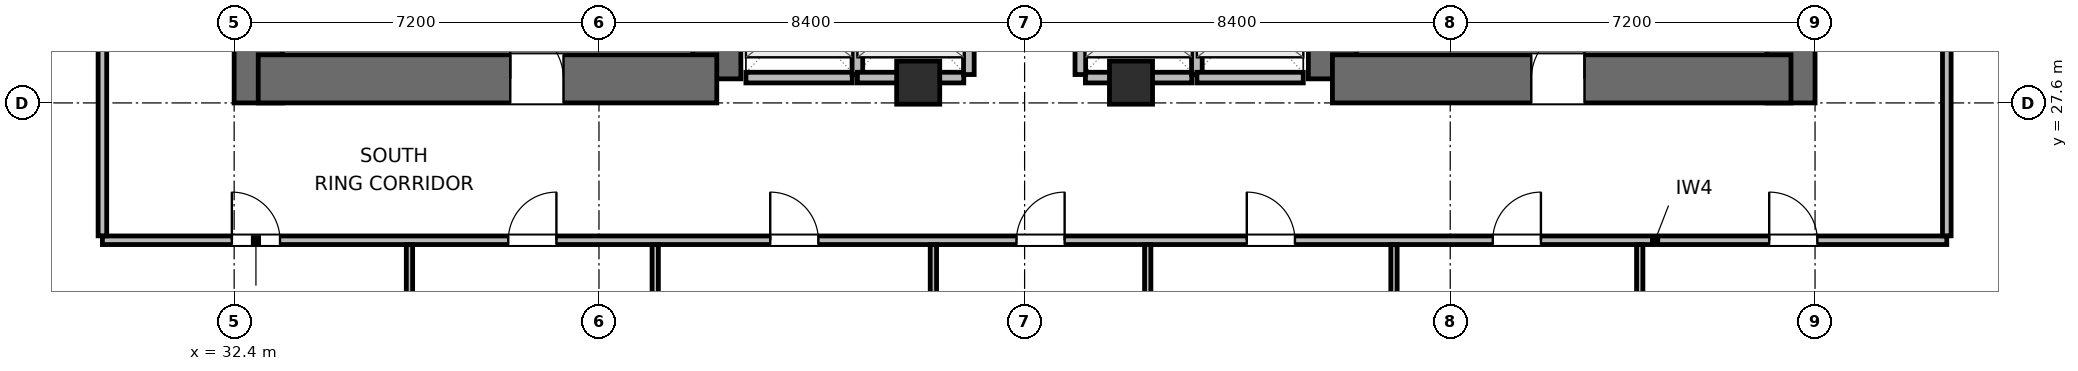
"""IFC4 building model, lengths in metres.
Left out: names, types, materials, properties, quantities, classifications, styles, units other than length and angle.
Written with IfcOpenShell. Run it as: python <this file> out.ifc"""

import sys

from ifc_helpers import new_model, si_unit, direction, frame, frame_2d, origin, origin_2d, place, context, subcontext, project, spatial, rectangle, extrude, element, fill, save


model = new_model("IFC4")
c1 = context("Model", 3, precision=1e-05, world=origin(), true_north=direction((0.0, 1.0)))
c2 = subcontext(c1, "Body", "Model", "MODEL_VIEW")
j1 = project(units=[si_unit("LENGTHUNIT", "METRE"), si_unit("PLANEANGLEUNIT", "RADIAN")], contexts=[c1])
p1 = place(None, origin())
s1 = spatial("IfcSite", under=j1, at=p1, CompositionType="ELEMENT")
p2 = place(p1, origin())
s2 = spatial("IfcBuilding", under=s1, at=p2, CompositionType="ELEMENT")
p3 = place(p2, frame((0.0, 0.0, 45.0)))
s3 = spatial("IfcBuildingStorey", under=s2, at=p3, CompositionType="ELEMENT", Elevation=45.0)
p4 = place(p3, frame((32.875, 27.6, 0.0), z_axis=(0.0, 0.0, 1.0), x_axis=(0.0, 1.0, 0.0)))
e1 = element("IfcWall", 1, at=p4, inside=s3, PredefinedType="SHEAR", context=c2, shape_type="SweptSolid", body=[
    extrude(rectangle(XDim=16.8, YDim=0.95, at=frame_2d((8.4, 0.0))), origin(), (0.0, 0.0, 1.0), 3.9),
])
p5 = place(p3, frame((41.925, 28.075, 0.0), z_axis=(0.0, 0.0, 1.0), x_axis=(0.0, 1.0, 0.0)))
e2 = element("IfcWall", 2, at=p5, inside=s3, PredefinedType="SHEAR", context=c2, shape_type="SweptSolid", body=[
    extrude(rectangle(XDim=6.325, YDim=0.95, at=frame_2d((3.163, 0.0))), origin(), (0.0, 0.0, 1.0), 3.9),
])
p6 = place(p3, frame((32.875, 28.075, 0.0), z_axis=(0.0, 0.0, 1.0), x_axis=(1.0, 0.0, 0.0)))
e3 = element("IfcWall", 3, at=p6, inside=s3, PredefinedType="SHEAR", context=c2, shape_type="SweptSolid", body=[
    extrude(rectangle(XDim=9.05, YDim=0.95, at=frame_2d((4.525, 0.0))), origin(), (0.0, 0.0, 1.0), 3.9),
])
p7 = place(p6, frame((4.975, 0.0, 0.0)))
e4 = element("IfcOpeningElement", 4, at=p7, cuts=e3, PredefinedType="OPENING", context=c2, shape_type="SweptSolid", body=[
    extrude(rectangle(XDim=1.05, YDim=2.04, at=frame_2d((0.525, 1.02))), frame((0.0, 0.485, 0.0), z_axis=(0.0, -1.0, 0.0), x_axis=(1.0, 0.0, 0.0)), (0.0, 0.0, 1.0), 0.97),
])
p8 = place(p3, frame((54.075, 28.075, 0.0), z_axis=(0.0, 0.0, 1.0), x_axis=(0.0, 1.0, 0.0)))
e5 = element("IfcWall", 5, at=p8, inside=s3, PredefinedType="SHEAR", context=c2, shape_type="SweptSolid", body=[
    extrude(rectangle(XDim=7.725, YDim=0.95, at=frame_2d((3.863, 0.0))), origin(), (0.0, 0.0, 1.0), 3.9),
])
p9 = place(p3, frame((63.125, 27.6, 0.0), z_axis=(0.0, 0.0, 1.0), x_axis=(0.0, 1.0, 0.0)))
e6 = element("IfcWall", 6, at=p9, inside=s3, PredefinedType="SHEAR", context=c2, shape_type="SweptSolid", body=[
    extrude(rectangle(XDim=16.8, YDim=0.95, at=frame_2d((8.4, 0.0))), origin(), (0.0, 0.0, 1.0), 3.9),
])
p10 = place(p3, frame((54.075, 28.075, 0.0), z_axis=(0.0, 0.0, 1.0), x_axis=(1.0, 0.0, 0.0)))
e7 = element("IfcWall", 7, at=p10, inside=s3, PredefinedType="SHEAR", context=c2, shape_type="SweptSolid", body=[
    extrude(rectangle(XDim=9.05, YDim=0.95, at=frame_2d((4.525, 0.0))), origin(), (0.0, 0.0, 1.0), 3.9),
])
p11 = place(p10, frame((3.925, 0.0, 0.0)))
e8 = element("IfcOpeningElement", 8, at=p11, cuts=e7, PredefinedType="OPENING", context=c2, shape_type="SweptSolid", body=[
    extrude(rectangle(XDim=1.05, YDim=2.04, at=frame_2d((0.525, 1.02))), frame((0.0, 0.485, 0.0), z_axis=(0.0, -1.0, 0.0), x_axis=(1.0, 0.0, 0.0)), (0.0, 0.0, 1.0), 0.97),
])
for number, where, z_axis, x_axis in (
    (9, (45.9, 28.0, 0.0), (0.0, 0.0, 1.0), (1.0, 0.0, 0.0)),
    (10, (50.1, 28.0, 0.0), (0.0, 0.0, 1.0), (1.0, 0.0, 0.0)),
):
    element("IfcColumn", number, at=place(p3, frame(where, z_axis=z_axis, x_axis=x_axis)), inside=s3, PredefinedType="COLUMN", context=c2, shape_type="SweptSolid", body=[
        extrude(rectangle(XDim=0.85, YDim=0.85, at=origin_2d()), origin(), (0.0, 0.0, 1.0), 3.9),
    ])
p12 = place(p3, frame((42.5, 28.1, 0.0), z_axis=(0.0, 0.0, 1.0), x_axis=(1.0, 0.0, 0.0)))
e11 = element("IfcWall", 11, at=p12, inside=s3, PredefinedType="PARTITIONING", context=c2, shape_type="SweptSolid", body=[
    extrude(rectangle(XDim=2.1, YDim=0.21, at=frame_2d((1.05, 0.0))), origin(), (0.0, 0.0, 1.0), 2.525),
])
p13 = place(p3, frame((44.7, 28.16, 0.0), z_axis=(0.0, 0.0, 1.0), x_axis=(0.0, 1.0, 0.0)))
e12 = element("IfcWall", 12, at=p13, inside=s3, PredefinedType="PARTITIONING", context=c2, shape_type="SweptSolid", body=[
    extrude(rectangle(XDim=2.28, YDim=0.21, at=frame_2d((1.14, 0.0))), origin(), (0.0, 0.0, 1.0), 3.64),
])
p14 = place(p3, frame((44.7, 28.1, 0.0), z_axis=(0.0, 0.0, 1.0), x_axis=(1.0, 0.0, 0.0)))
e13 = element("IfcWall", 13, at=p14, inside=s3, PredefinedType="PARTITIONING", context=c2, shape_type="SweptSolid", body=[
    extrude(rectangle(XDim=2.1, YDim=0.21, at=frame_2d((1.05, 0.0))), origin(), (0.0, 0.0, 1.0), 2.525),
])
p15 = place(p3, frame((46.9, 28.16, 0.0), z_axis=(0.0, 0.0, 1.0), x_axis=(0.0, 1.0, 0.0)))
e14 = element("IfcWall", 14, at=p15, inside=s3, PredefinedType="PARTITIONING", context=c2, shape_type="SweptSolid", body=[
    extrude(rectangle(XDim=2.28, YDim=0.21, at=frame_2d((1.14, 0.0))), origin(), (0.0, 0.0, 1.0), 3.64),
])
p16 = place(p3, frame((49.2, 28.1, 0.0), z_axis=(0.0, 0.0, 1.0), x_axis=(1.0, 0.0, 0.0)))
e15 = element("IfcWall", 15, at=p16, inside=s3, PredefinedType="PARTITIONING", context=c2, shape_type="SweptSolid", body=[
    extrude(rectangle(XDim=2.1, YDim=0.21, at=frame_2d((1.05, 0.0))), origin(), (0.0, 0.0, 1.0), 2.525),
])
for number, where, z_axis, x_axis in (
    (16, (49.1, 28.16, 0.0), (0.0, 0.0, 1.0), (0.0, 1.0, 0.0)),
    (17, (51.4, 28.16, 0.0), (0.0, 0.0, 1.0), (0.0, 1.0, 0.0)),
):
    element("IfcWall", number, at=place(p3, frame(where, z_axis=z_axis, x_axis=x_axis)), inside=s3, PredefinedType="PARTITIONING", context=c2, shape_type="SweptSolid", body=[
        extrude(rectangle(XDim=2.28, YDim=0.21, at=frame_2d((1.14, 0.0))), origin(), (0.0, 0.0, 1.0), 3.64),
    ])
p17 = place(p3, frame((51.4, 28.1, 0.0), z_axis=(0.0, 0.0, 1.0), x_axis=(1.0, 0.0, 0.0)))
e18 = element("IfcWall", 18, at=p17, inside=s3, PredefinedType="PARTITIONING", context=c2, shape_type="SweptSolid", body=[
    extrude(rectangle(XDim=2.1, YDim=0.21, at=frame_2d((1.05, 0.0))), origin(), (0.0, 0.0, 1.0), 2.525),
])
p18 = place(p3, frame((29.8, 24.89, 0.0), z_axis=(0.0, 0.0, 1.0), x_axis=(1.0, 0.0, 0.0)))
e19 = element("IfcWall", 19, at=p18, inside=s3, PredefinedType="PARTITIONING", context=c2, shape_type="SweptSolid", body=[
    extrude(rectangle(XDim=36.4, YDim=0.17, at=frame_2d((18.2, 0.0))), origin(), (0.0, 0.0, 1.0), 3.64),
])
p19 = place(p18, frame((2.555, 0.0, 0.0)))
e20 = element("IfcOpeningElement", 20, at=p19, cuts=e19, PredefinedType="OPENING", context=c2, shape_type="SweptSolid", body=[
    extrude(rectangle(XDim=0.95, YDim=2.04, at=frame_2d((0.475, 1.02))), frame((0.0, 0.095, 0.0), z_axis=(0.0, -1.0, 0.0), x_axis=(1.0, 0.0, 0.0)), (0.0, 0.0, 1.0), 0.19),
])
p20 = place(p18, frame((8.01, 0.0, 0.0)))
e21 = element("IfcOpeningElement", 21, at=p20, cuts=e19, PredefinedType="OPENING", context=c2, shape_type="SweptSolid", body=[
    extrude(rectangle(XDim=0.95, YDim=2.04, at=frame_2d((0.475, 1.02))), frame((0.0, 0.095, 0.0), z_axis=(0.0, -1.0, 0.0), x_axis=(1.0, 0.0, 0.0)), (0.0, 0.0, 1.0), 0.19),
])
p21 = place(p18, frame((13.18, 0.0, 0.0)))
e22 = element("IfcOpeningElement", 22, at=p21, cuts=e19, PredefinedType="OPENING", context=c2, shape_type="SweptSolid", body=[
    extrude(rectangle(XDim=0.95, YDim=2.04, at=frame_2d((0.475, 1.02))), frame((0.0, 0.095, 0.0), z_axis=(0.0, -1.0, 0.0), x_axis=(1.0, 0.0, 0.0)), (0.0, 0.0, 1.0), 0.19),
])
p22 = place(p18, frame((18.04, 0.0, 0.0)))
e23 = element("IfcOpeningElement", 23, at=p22, cuts=e19, PredefinedType="OPENING", context=c2, shape_type="SweptSolid", body=[
    extrude(rectangle(XDim=0.95, YDim=2.04, at=frame_2d((0.475, 1.02))), frame((0.0, 0.095, 0.0), z_axis=(0.0, -1.0, 0.0), x_axis=(1.0, 0.0, 0.0)), (0.0, 0.0, 1.0), 0.19),
])
p23 = place(p18, frame((22.585, 0.0, 0.0)))
e24 = element("IfcOpeningElement", 24, at=p23, cuts=e19, PredefinedType="OPENING", context=c2, shape_type="SweptSolid", body=[
    extrude(rectangle(XDim=0.95, YDim=2.04, at=frame_2d((0.475, 1.02))), frame((0.0, 0.095, 0.0), z_axis=(0.0, -1.0, 0.0), x_axis=(1.0, 0.0, 0.0)), (0.0, 0.0, 1.0), 0.19),
])
p24 = place(p18, frame((27.44, 0.0, 0.0)))
e25 = element("IfcOpeningElement", 25, at=p24, cuts=e19, PredefinedType="OPENING", context=c2, shape_type="SweptSolid", body=[
    extrude(rectangle(XDim=0.95, YDim=2.04, at=frame_2d((0.475, 1.02))), frame((0.0, 0.095, 0.0), z_axis=(0.0, -1.0, 0.0), x_axis=(1.0, 0.0, 0.0)), (0.0, 0.0, 1.0), 0.19),
])
p25 = place(p18, frame((32.895, 0.0, 0.0)))
e26 = element("IfcOpeningElement", 26, at=p25, cuts=e19, PredefinedType="OPENING", context=c2, shape_type="SweptSolid", body=[
    extrude(rectangle(XDim=0.95, YDim=2.04, at=frame_2d((0.475, 1.02))), frame((0.0, 0.095, 0.0), z_axis=(0.0, -1.0, 0.0), x_axis=(1.0, 0.0, 0.0)), (0.0, 0.0, 1.0), 0.19),
])
p26 = place(p3, frame((29.8, 24.977, 0.0), z_axis=(0.0, 0.0, 1.0), x_axis=(0.0, 1.0, 0.0)))
e27 = element("IfcWall", 27, at=p26, inside=s3, PredefinedType="PARTITIONING", context=c2, shape_type="SweptSolid", body=[
    extrude(rectangle(XDim=22.046, YDim=0.17, at=frame_2d((11.023, 0.0))), origin(), (0.0, 0.0, 1.0), 3.64),
])
p27 = place(p26, frame((10.548, 0.0, 0.0)))
e28 = element("IfcOpeningElement", 28, at=p27, cuts=e27, PredefinedType="OPENING", context=c2, shape_type="SweptSolid", body=[
    extrude(rectangle(XDim=0.95, YDim=2.04, at=frame_2d((0.475, 1.02))), frame((0.0, 0.095, 0.0), z_axis=(0.0, -1.0, 0.0), x_axis=(1.0, 0.0, 0.0)), (0.0, 0.0, 1.0), 0.19),
])
p28 = place(p3, frame((66.2, 24.977, 0.0), z_axis=(0.0, 0.0, 1.0), x_axis=(0.0, 1.0, 0.0)))
e29 = element("IfcWall", 29, at=p28, inside=s3, PredefinedType="PARTITIONING", context=c2, shape_type="SweptSolid", body=[
    extrude(rectangle(XDim=22.046, YDim=0.17, at=frame_2d((11.023, 0.0))), origin(), (0.0, 0.0, 1.0), 3.64),
])
p29 = place(p28, frame((4.493, 0.0, 0.0)))
e30 = element("IfcOpeningElement", 30, at=p29, cuts=e29, PredefinedType="OPENING", context=c2, shape_type="SweptSolid", body=[
    extrude(rectangle(XDim=0.95, YDim=2.04, at=frame_2d((0.475, 1.02))), frame((0.0, 0.095, 0.0), z_axis=(0.0, -1.0, 0.0), x_axis=(1.0, 0.0, 0.0)), (0.0, 0.0, 1.0), 0.19),
])
p30 = place(p28, frame((15.603, 0.0, 0.0)))
e31 = element("IfcOpeningElement", 31, at=p30, cuts=e29, PredefinedType="OPENING", context=c2, shape_type="SweptSolid", body=[
    extrude(rectangle(XDim=0.95, YDim=2.04, at=frame_2d((0.475, 1.02))), frame((0.0, 0.095, 0.0), z_axis=(0.0, -1.0, 0.0), x_axis=(1.0, 0.0, 0.0)), (0.0, 0.0, 1.0), 0.19),
])
p31 = place(p3, frame((35.86, 9.915, 0.0), z_axis=(0.0, 0.0, 1.0), x_axis=(0.0, 1.0, 0.0)))
e32 = element("IfcWall", 32, at=p31, inside=s3, PredefinedType="PARTITIONING", context=c2, shape_type="SweptSolid", body=[
    extrude(rectangle(XDim=14.888, YDim=0.125, at=frame_2d((7.444, 0.0))), origin(), (0.0, 0.0, 1.0), 3.64),
])
p32 = place(p3, frame((40.71, 9.915, 0.0), z_axis=(0.0, 0.0, 1.0), x_axis=(0.0, 1.0, 0.0)))
e33 = element("IfcWall", 33, at=p32, inside=s3, PredefinedType="PARTITIONING", context=c2, shape_type="SweptSolid", body=[
    extrude(rectangle(XDim=14.888, YDim=0.125, at=frame_2d((7.444, 0.0))), origin(), (0.0, 0.0, 1.0), 3.003),
])
p33 = place(p3, frame((46.2, 13.575, 0.0), z_axis=(0.0, 0.0, 1.0), x_axis=(0.0, 1.0, 0.0)))
e34 = element("IfcWall", 34, at=p33, inside=s3, PredefinedType="PARTITIONING", context=c2, shape_type="SweptSolid", body=[
    extrude(rectangle(XDim=11.228, YDim=0.125, at=frame_2d((5.614, 0.0))), origin(), (0.0, 0.0, 1.0), 3.64),
])
p34 = place(p3, frame((50.43, 11.515, 0.0), z_axis=(0.0, 0.0, 1.0), x_axis=(0.0, 1.0, 0.0)))
e35 = element("IfcWall", 35, at=p34, inside=s3, PredefinedType="PARTITIONING", context=c2, shape_type="SweptSolid", body=[
    extrude(rectangle(XDim=13.288, YDim=0.125, at=frame_2d((6.644, 0.0))), origin(), (0.0, 0.0, 1.0), 3.64),
])
p35 = place(p3, frame((55.29, 9.915, 0.0), z_axis=(0.0, 0.0, 1.0), x_axis=(0.0, 1.0, 0.0)))
e36 = element("IfcWall", 36, at=p35, inside=s3, PredefinedType="PARTITIONING", context=c2, shape_type="SweptSolid", body=[
    extrude(rectangle(XDim=14.888, YDim=0.125, at=frame_2d((7.444, 0.0))), origin(), (0.0, 0.0, 1.0), 3.003),
])
p36 = place(p3, frame((60.14, 9.915, 0.0), z_axis=(0.0, 0.0, 1.0), x_axis=(0.0, 1.0, 0.0)))
e37 = element("IfcWall", 37, at=p36, inside=s3, PredefinedType="PARTITIONING", context=c2, shape_type="SweptSolid", body=[
    extrude(rectangle(XDim=14.888, YDim=0.125, at=frame_2d((7.444, 0.0))), origin(), (0.0, 0.0, 1.0), 3.64),
])
p37 = place(p7, origin())
e38 = element("IfcDoor", 38, at=p37, inside=s3, OperationType="SINGLE_SWING_LEFT", PredefinedType="DOOR", context=c2, shape_type="SweptSolid", body=[
    extrude(rectangle(XDim=1.05, YDim=2.04, at=frame_2d((0.525, 1.02))), frame((0.0, 0.025, 0.0), z_axis=(0.0, -1.0, 0.0), x_axis=(1.0, 0.0, 0.0)), (0.0, 0.0, 1.0), 0.05),
])
fill(e4, e38)
p38 = place(p11, origin())
e39 = element("IfcDoor", 39, at=p38, inside=s3, OperationType="SINGLE_SWING_RIGHT", PredefinedType="DOOR", context=c2, shape_type="SweptSolid", body=[
    extrude(rectangle(XDim=1.05, YDim=2.04, at=frame_2d((0.525, 1.02))), frame((0.0, 0.025, 0.0), z_axis=(0.0, -1.0, 0.0), x_axis=(1.0, 0.0, 0.0)), (0.0, 0.0, 1.0), 0.05),
])
fill(e8, e39)
p39 = place(p19, origin())
e40 = element("IfcDoor", 40, at=p39, inside=s3, OperationType="SINGLE_SWING_LEFT", PredefinedType="DOOR", context=c2, shape_type="SweptSolid", body=[
    extrude(rectangle(XDim=0.95, YDim=2.04, at=frame_2d((0.475, 1.02))), frame((0.0, 0.025, 0.0), z_axis=(0.0, -1.0, 0.0), x_axis=(1.0, 0.0, 0.0)), (0.0, 0.0, 1.0), 0.05),
])
fill(e20, e40)
p40 = place(p20, origin())
e41 = element("IfcDoor", 41, at=p40, inside=s3, OperationType="SINGLE_SWING_RIGHT", PredefinedType="DOOR", context=c2, shape_type="SweptSolid", body=[
    extrude(rectangle(XDim=0.95, YDim=2.04, at=frame_2d((0.475, 1.02))), frame((0.0, 0.025, 0.0), z_axis=(0.0, -1.0, 0.0), x_axis=(1.0, 0.0, 0.0)), (0.0, 0.0, 1.0), 0.05),
])
fill(e21, e41)
p41 = place(p21, origin())
e42 = element("IfcDoor", 42, at=p41, inside=s3, OperationType="SINGLE_SWING_LEFT", PredefinedType="DOOR", context=c2, shape_type="SweptSolid", body=[
    extrude(rectangle(XDim=0.95, YDim=2.04, at=frame_2d((0.475, 1.02))), frame((0.0, 0.025, 0.0), z_axis=(0.0, -1.0, 0.0), x_axis=(1.0, 0.0, 0.0)), (0.0, 0.0, 1.0), 0.05),
])
fill(e22, e42)
p42 = place(p22, origin())
e43 = element("IfcDoor", 43, at=p42, inside=s3, OperationType="SINGLE_SWING_RIGHT", PredefinedType="DOOR", context=c2, shape_type="SweptSolid", body=[
    extrude(rectangle(XDim=0.95, YDim=2.04, at=frame_2d((0.475, 1.02))), frame((0.0, 0.025, 0.0), z_axis=(0.0, -1.0, 0.0), x_axis=(1.0, 0.0, 0.0)), (0.0, 0.0, 1.0), 0.05),
])
fill(e23, e43)
p43 = place(p23, origin())
e44 = element("IfcDoor", 44, at=p43, inside=s3, OperationType="SINGLE_SWING_LEFT", PredefinedType="DOOR", context=c2, shape_type="SweptSolid", body=[
    extrude(rectangle(XDim=0.95, YDim=2.04, at=frame_2d((0.475, 1.02))), frame((0.0, 0.025, 0.0), z_axis=(0.0, -1.0, 0.0), x_axis=(1.0, 0.0, 0.0)), (0.0, 0.0, 1.0), 0.05),
])
fill(e24, e44)
p44 = place(p24, origin())
e45 = element("IfcDoor", 45, at=p44, inside=s3, OperationType="SINGLE_SWING_RIGHT", PredefinedType="DOOR", context=c2, shape_type="SweptSolid", body=[
    extrude(rectangle(XDim=0.95, YDim=2.04, at=frame_2d((0.475, 1.02))), frame((0.0, 0.025, 0.0), z_axis=(0.0, -1.0, 0.0), x_axis=(1.0, 0.0, 0.0)), (0.0, 0.0, 1.0), 0.05),
])
fill(e25, e45)
p45 = place(p25, origin())
e46 = element("IfcDoor", 46, at=p45, inside=s3, OperationType="SINGLE_SWING_LEFT", PredefinedType="DOOR", context=c2, shape_type="SweptSolid", body=[
    extrude(rectangle(XDim=0.95, YDim=2.04, at=frame_2d((0.475, 1.02))), frame((0.0, 0.025, 0.0), z_axis=(0.0, -1.0, 0.0), x_axis=(1.0, 0.0, 0.0)), (0.0, 0.0, 1.0), 0.05),
])
fill(e26, e46)
save(model, sys.argv[1])
